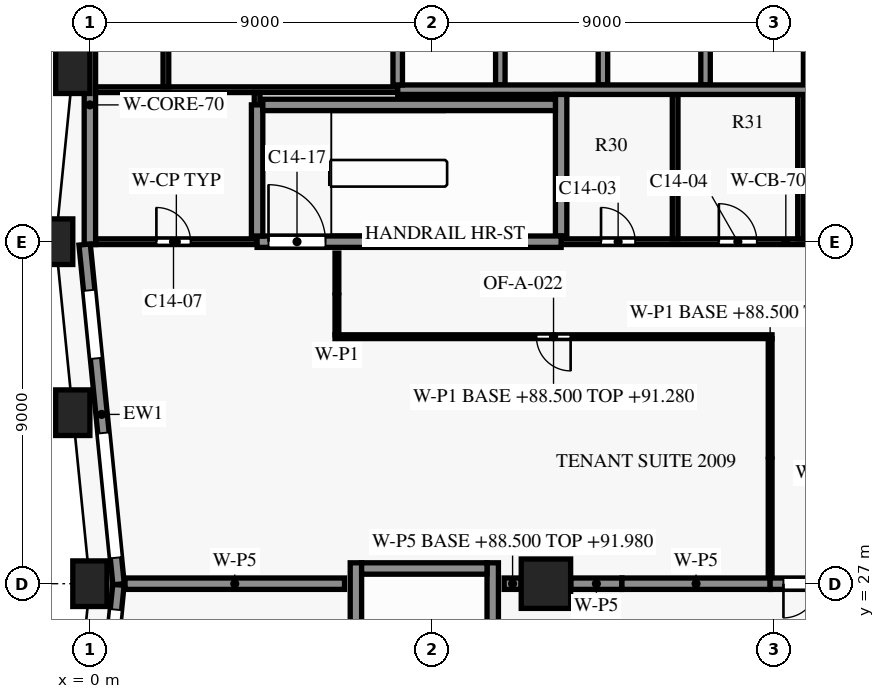
"""IFC4 building model, lengths in metres.
Left out: names, types, materials, properties, quantities, classifications, styles, units other than length and angle.
Written with IfcOpenShell. Run it as: python <this file> out.ifc"""

import sys

from ifc_helpers import new_model, si_unit, direction, frame, frame_2d, origin, origin_2d, place, context, subcontext, project, spatial, rectangle, extrude, element, fill, save


model = new_model("IFC4")
c1 = context("Model", 3, precision=1e-05, world=origin(), true_north=direction((0.0, 1.0)))
c2 = subcontext(c1, "Body", "Model", "MODEL_VIEW")
j1 = project(units=[si_unit("LENGTHUNIT", "METRE"), si_unit("PLANEANGLEUNIT", "RADIAN")], contexts=[c1])
p1 = place(None, origin())
s1 = spatial("IfcSite", under=j1, at=p1, CompositionType="ELEMENT")
p2 = place(p1, origin())
s2 = spatial("IfcBuilding", under=s1, at=p2, CompositionType="ELEMENT")
p3 = place(p2, frame((0.0, 0.0, 88.5)))
s3 = spatial("IfcBuildingStorey", under=s2, at=p3, CompositionType="ELEMENT", Elevation=88.5)
for number, where, z_axis, x_axis in (
    (1, (-0.45, 40.5, 0.0), (0.0, 0.0, 1.0), (-0.1, -0.995, 0.0)),
    (2, (-0.9, 36.0, 0.0), (0.0, 0.0, 1.0), (0.0, -1.0, 0.0)),
    (3, (-0.45, 31.5, 0.0), (0.0, 0.0, 1.0), (0.1, -0.995, 0.0)),
    (4, (0.0, 27.0, 0.0), (0.0, 0.0, 1.0), (0.0, -1.0, 0.0)),
):
    element("IfcColumn", number, at=place(p3, frame(where, z_axis=z_axis, x_axis=x_axis)), inside=s3, PredefinedType="COLUMN", context=c2, shape_type="SweptSolid", body=[
        extrude(rectangle(XDim=0.9, YDim=1.2, at=origin_2d()), origin(), (0.0, 0.0, 1.0), 3.8),
    ])
p4 = place(p3, frame((12.0, 27.0, 0.0), z_axis=(0.0, 0.0, 1.0), x_axis=(1.0, 0.0, 0.0)))
e5 = element("IfcColumn", 5, at=p4, inside=s3, PredefinedType="COLUMN", context=c2, shape_type="SweptSolid", body=[
    extrude(rectangle(XDim=1.3, YDim=1.3, at=origin_2d()), origin(), (0.0, 0.0, 1.0), 3.8),
])
p5 = place(p3, frame((0.755, 26.985, 0.0), z_axis=(0.0, 0.0, 1.0), x_axis=(-0.099479505633, 0.995039611251, 0.0)))
e6 = element("IfcWall", 6, at=p5, inside=s3, PredefinedType="SOLIDWALL", context=c2, shape_type="SweptSolid", body=[
    extrude(rectangle(XDim=8.985, YDim=0.3, at=frame_2d((4.492, 0.0))), origin(), (0.0, 0.0, 1.0), 3.15),
])
p6 = place(p5, frame((0.701, 0.0, 0.15)))
e7 = element("IfcOpeningElement", 7, at=p6, cuts=e6, PredefinedType="OPENING", context=c2, shape_type="SweptSolid", body=[
    extrude(rectangle(XDim=3.3, YDim=2.4, at=frame_2d((1.65, 1.2))), frame((0.0, 0.16, 0.0), z_axis=(0.0, -1.0, 0.0), x_axis=(1.0, 0.0, 0.0)), (0.0, 0.0, 1.0), 0.32),
])
p7 = place(p5, frame((5.974, 0.0, 0.75)))
e8 = element("IfcOpeningElement", 8, at=p7, cuts=e6, PredefinedType="OPENING", context=c2, shape_type="SweptSolid", body=[
    extrude(rectangle(XDim=1.8, YDim=1.8, at=frame_2d((0.9, 0.9))), frame((0.0, 0.16, 0.0), z_axis=(0.0, -1.0, 0.0), x_axis=(1.0, 0.0, 0.0)), (0.0, 0.0, 1.0), 0.32),
])
p8 = place(p3, frame((-0.148, 17.985, 0.0), z_axis=(0.0, 0.0, 1.0), x_axis=(0.099495688264, 0.995037993253, 0.0)))
e9 = element("IfcWall", 9, at=p8, inside=s3, PredefinedType="SOLIDWALL", context=c2, shape_type="SweptSolid", body=[
    extrude(rectangle(XDim=9.03, YDim=0.3, at=frame_2d((4.515, 0.0))), origin(), (0.0, 0.0, 1.0), 3.15),
])
p9 = place(p8, frame((1.301, 0.0, 0.75)))
e10 = element("IfcOpeningElement", 10, at=p9, cuts=e9, PredefinedType="OPENING", context=c2, shape_type="SweptSolid", body=[
    extrude(rectangle(XDim=1.8, YDim=1.8, at=frame_2d((0.9, 0.9))), frame((0.0, 0.16, 0.0), z_axis=(0.0, -1.0, 0.0), x_axis=(1.0, 0.0, 0.0)), (0.0, 0.0, 1.0), 0.32),
])
p10 = place(p8, frame((5.073, 0.0, 0.15)))
e11 = element("IfcOpeningElement", 11, at=p10, cuts=e9, PredefinedType="OPENING", context=c2, shape_type="SweptSolid", body=[
    extrude(rectangle(XDim=3.3, YDim=2.4, at=frame_2d((1.65, 1.2))), frame((0.0, 0.16, 0.0), z_axis=(0.0, -1.0, 0.0), x_axis=(1.0, 0.0, 0.0)), (0.0, 0.0, 1.0), 0.32),
])
p11 = place(p3, frame((7.15, 27.4, 0.0), z_axis=(0.0, 0.0, 1.0), x_axis=(1.0, 0.0, 0.0)))
e12 = element("IfcWall", 12, at=p11, inside=s3, PredefinedType="SHEAR", context=c2, shape_type="SweptSolid", body=[
    extrude(rectangle(XDim=3.3, YDim=0.3, at=frame_2d((1.65, 0.0))), origin(), (0.0, 0.0, 1.0), 3.5),
])
p12 = place(p3, frame((0.15, 36.0, 0.0), z_axis=(0.0, 0.0, 1.0), x_axis=(1.0, 0.0, 0.0)))
e13 = element("IfcWall", 13, at=p12, inside=s3, PredefinedType="PARTITIONING", context=c2, shape_type="SweptSolid", body=[
    extrude(rectangle(XDim=4.25, YDim=0.15, at=frame_2d((2.125, 0.0))), origin(), (0.0, 0.0, 1.0), 3.5),
])
p13 = place(p12, frame((1.6, 0.0, 0.0)))
e14 = element("IfcOpeningElement", 14, at=p13, cuts=e13, PredefinedType="OPENING", context=c2, shape_type="SweptSolid", body=[
    extrude(rectangle(XDim=0.9, YDim=2.1, at=frame_2d((0.45, 1.05))), frame((0.0, 0.085, 0.0), z_axis=(0.0, -1.0, 0.0), x_axis=(1.0, 0.0, 0.0)), (0.0, 0.0, 1.0), 0.17),
])
p14 = place(p3, frame((12.4, 36.0, 0.0), z_axis=(0.0, 0.0, 1.0), x_axis=(1.0, 0.0, 0.0)))
e15 = element("IfcWall", 15, at=p14, inside=s3, PredefinedType="SHEAR", context=c2, shape_type="SweptSolid", body=[
    extrude(rectangle(XDim=11.825, YDim=0.15, at=frame_2d((5.913, 0.0))), origin(), (0.0, 0.0, 1.0), 3.5),
])
p15 = place(p14, frame((1.05, 0.0, 0.0)))
e16 = element("IfcOpeningElement", 16, at=p15, cuts=e15, PredefinedType="OPENING", context=c2, shape_type="SweptSolid", body=[
    extrude(rectangle(XDim=0.9, YDim=2.1, at=frame_2d((0.45, 1.05))), frame((0.0, 0.085, 0.0), z_axis=(0.0, -1.0, 0.0), x_axis=(1.0, 0.0, 0.0)), (0.0, 0.0, 1.0), 0.17),
])
p16 = place(p14, frame((4.15, 0.0, 0.0)))
e17 = element("IfcOpeningElement", 17, at=p16, cuts=e15, PredefinedType="OPENING", context=c2, shape_type="SweptSolid", body=[
    extrude(rectangle(XDim=1.0, YDim=2.1, at=frame_2d((0.5, 1.05))), frame((0.0, 0.085, 0.0), z_axis=(0.0, -1.0, 0.0), x_axis=(1.0, 0.0, 0.0)), (0.0, 0.0, 1.0), 0.17),
])
p17 = place(p14, frame((7.35, 0.0, 0.0)))
e18 = element("IfcOpeningElement", 18, at=p17, cuts=e15, PredefinedType="OPENING", context=c2, shape_type="SweptSolid", body=[
    extrude(rectangle(XDim=0.9, YDim=2.1, at=frame_2d((0.45, 1.05))), frame((0.0, 0.085, 0.0), z_axis=(0.0, -1.0, 0.0), x_axis=(1.0, 0.0, 0.0)), (0.0, 0.0, 1.0), 0.17),
])
p18 = place(p14, frame((10.125, 0.0, 0.0)))
e19 = element("IfcOpeningElement", 19, at=p18, cuts=e15, PredefinedType="OPENING", context=c2, shape_type="SweptSolid", body=[
    extrude(rectangle(XDim=0.95, YDim=2.1, at=frame_2d((0.475, 1.05))), frame((0.0, 0.085, 0.0), z_axis=(0.0, -1.0, 0.0), x_axis=(1.0, 0.0, 0.0)), (0.0, 0.0, 1.0), 0.17),
])
p19 = place(p3, frame((4.4, 36.0, 0.0), z_axis=(0.0, 0.0, 1.0), x_axis=(1.0, 0.0, 0.0)))
e20 = element("IfcWall", 20, at=p19, inside=s3, PredefinedType="SHEAR", context=c2, shape_type="SweptSolid", body=[
    extrude(rectangle(XDim=8.0, YDim=0.3, at=frame_2d((4.0, 0.0))), origin(), (0.0, 0.0, 1.0), 3.5),
])
p20 = place(p19, frame((0.3, 0.0, 0.0)))
e21 = element("IfcOpeningElement", 21, at=p20, cuts=e20, PredefinedType="OPENING", context=c2, shape_type="SweptSolid", body=[
    extrude(rectangle(XDim=1.5, YDim=2.2, at=frame_2d((0.75, 1.1))), frame((0.0, 0.16, 0.0), z_axis=(0.0, -1.0, 0.0), x_axis=(1.0, 0.0, 0.0)), (0.0, 0.0, 1.0), 0.32),
])
p21 = place(p3, frame((4.55, 39.6, 0.0), z_axis=(0.0, 0.0, 1.0), x_axis=(1.0, 0.0, 0.0)))
e22 = element("IfcWall", 22, at=p21, inside=s3, PredefinedType="SHEAR", context=c2, shape_type="SweptSolid", body=[
    extrude(rectangle(XDim=7.7, YDim=0.3, at=frame_2d((3.85, 0.0))), origin(), (0.0, 0.0, 1.0), 3.5),
])
p22 = place(p3, frame((0.15, 40.0, 0.0), z_axis=(0.0, 0.0, 1.0), x_axis=(1.0, 0.0, 0.0)))
e23 = element("IfcWall", 23, at=p22, inside=s3, PredefinedType="PARTITIONING", context=c2, shape_type="SweptSolid", body=[
    extrude(rectangle(XDim=7.95, YDim=0.15, at=frame_2d((3.975, 0.0))), origin(), (0.0, 0.0, 1.0), 3.5),
])
p23 = place(p3, frame((8.1, 40.0, 0.0), z_axis=(0.0, 0.0, 1.0), x_axis=(1.0, 0.0, 0.0)))
e24 = element("IfcWall", 24, at=p23, inside=s3, PredefinedType="SHEAR", context=c2, shape_type="SweptSolid", body=[
    extrude(rectangle(XDim=13.5, YDim=0.25, at=frame_2d((6.75, 0.0))), origin(), (0.0, 0.0, 1.0), 3.5),
])
p24 = place(p3, frame((0.0, 35.925, 0.0), z_axis=(0.0, 0.0, 1.0), x_axis=(0.0, 1.0, 0.0)))
e25 = element("IfcWall", 25, at=p24, inside=s3, PredefinedType="SHEAR", context=c2, shape_type="SweptSolid", body=[
    extrude(rectangle(XDim=7.35, YDim=0.3, at=frame_2d((3.675, 0.0))), origin(), (0.0, 0.0, 1.0), 3.5),
])
p25 = place(p3, frame((2.0, 40.075, 0.0), z_axis=(0.0, 0.0, 1.0), x_axis=(0.0, 1.0, 0.0)))
e26 = element("IfcWall", 26, at=p25, inside=s3, PredefinedType="PARTITIONING", context=c2, shape_type="SweptSolid", body=[
    extrude(rectangle(XDim=3.05, YDim=0.15, at=frame_2d((1.525, 0.0))), origin(), (0.0, 0.0, 1.0), 3.5),
])
p26 = place(p3, frame((4.4, 39.6, 0.0), z_axis=(0.0, 0.0, 1.0), x_axis=(0.0, 1.0, 0.0)))
e27 = element("IfcWall", 27, at=p26, inside=s3, PredefinedType="PARTITIONING", context=c2, shape_type="SweptSolid", body=[
    extrude(rectangle(XDim=0.325, YDim=0.15, at=frame_2d((0.163, 0.0))), origin(), (0.0, 0.0, 1.0), 3.5),
])
p27 = place(p3, frame((4.4, 36.15, 0.0), z_axis=(0.0, 0.0, 1.0), x_axis=(0.0, 1.0, 0.0)))
e28 = element("IfcWall", 28, at=p27, inside=s3, PredefinedType="SHEAR", context=c2, shape_type="SweptSolid", body=[
    extrude(rectangle(XDim=3.45, YDim=0.3, at=frame_2d((1.725, 0.0))), origin(), (0.0, 0.0, 1.0), 3.5),
])
p28 = place(p3, frame((7.0, 19.25, 0.0), z_axis=(0.0, 0.0, 1.0), x_axis=(0.0, 1.0, 0.0)))
e29 = element("IfcWall", 29, at=p28, inside=s3, PredefinedType="SHEAR", context=c2, shape_type="SweptSolid", body=[
    extrude(rectangle(XDim=8.3, YDim=0.3, at=frame_2d((4.15, 0.0))), origin(), (0.0, 0.0, 1.0), 3.5),
])
p29 = place(p3, frame((8.1, 40.125, 0.0), z_axis=(0.0, 0.0, 1.0), x_axis=(0.0, 1.0, 0.0)))
e30 = element("IfcWall", 30, at=p29, inside=s3, PredefinedType="SHEAR", context=c2, shape_type="SweptSolid", body=[
    extrude(rectangle(XDim=2.95, YDim=0.25, at=frame_2d((1.475, 0.0))), origin(), (0.0, 0.0, 1.0), 3.5),
])
p30 = place(p3, frame((10.6, 19.25, 0.0), z_axis=(0.0, 0.0, 1.0), x_axis=(0.0, 1.0, 0.0)))
e31 = element("IfcWall", 31, at=p30, inside=s3, PredefinedType="SHEAR", context=c2, shape_type="SweptSolid", body=[
    extrude(rectangle(XDim=8.3, YDim=0.3, at=frame_2d((4.15, 0.0))), origin(), (0.0, 0.0, 1.0), 3.5),
])
p31 = place(p30, frame((0.55, 0.0, 0.0)))
e32 = element("IfcOpeningElement", 32, at=p31, cuts=e31, PredefinedType="OPENING", context=c2, shape_type="SweptSolid", body=[
    extrude(rectangle(XDim=1.2, YDim=2.2, at=frame_2d((0.6, 1.1))), frame((0.0, 0.16, 0.0), z_axis=(0.0, -1.0, 0.0), x_axis=(1.0, 0.0, 0.0)), (0.0, 0.0, 1.0), 0.32),
])
p32 = place(p3, frame((10.8, 40.125, 0.0), z_axis=(0.0, 0.0, 1.0), x_axis=(0.0, 1.0, 0.0)))
e33 = element("IfcWall", 33, at=p32, inside=s3, PredefinedType="SHEAR", context=c2, shape_type="SweptSolid", body=[
    extrude(rectangle(XDim=2.95, YDim=0.25, at=frame_2d((1.475, 0.0))), origin(), (0.0, 0.0, 1.0), 3.5),
])
p33 = place(p3, frame((12.4, 36.15, 0.0), z_axis=(0.0, 0.0, 1.0), x_axis=(0.0, 1.0, 0.0)))
e34 = element("IfcWall", 34, at=p33, inside=s3, PredefinedType="SHEAR", context=c2, shape_type="SweptSolid", body=[
    extrude(rectangle(XDim=3.725, YDim=0.3, at=frame_2d((1.863, 0.0))), origin(), (0.0, 0.0, 1.0), 3.5),
])
p34 = place(p3, frame((13.5, 40.125, 0.0), z_axis=(0.0, 0.0, 1.0), x_axis=(0.0, 1.0, 0.0)))
e35 = element("IfcWall", 35, at=p34, inside=s3, PredefinedType="SHEAR", context=c2, shape_type="SweptSolid", body=[
    extrude(rectangle(XDim=2.95, YDim=0.25, at=frame_2d((1.475, 0.0))), origin(), (0.0, 0.0, 1.0), 3.5),
])
p35 = place(p3, frame((15.4, 36.075, 0.0), z_axis=(0.0, 0.0, 1.0), x_axis=(0.0, 1.0, 0.0)))
e36 = element("IfcWall", 36, at=p35, inside=s3, PredefinedType="PARTITIONING", context=c2, shape_type="SweptSolid", body=[
    extrude(rectangle(XDim=3.8, YDim=0.15, at=frame_2d((1.9, 0.0))), origin(), (0.0, 0.0, 1.0), 3.5),
])
p36 = place(p3, frame((16.2, 40.125, 0.0), z_axis=(0.0, 0.0, 1.0), x_axis=(0.0, 1.0, 0.0)))
e37 = element("IfcWall", 37, at=p36, inside=s3, PredefinedType="SHEAR", context=c2, shape_type="SweptSolid", body=[
    extrude(rectangle(XDim=2.95, YDim=0.25, at=frame_2d((1.475, 0.0))), origin(), (0.0, 0.0, 1.0), 3.5),
])
p37 = place(p3, frame((18.7, 36.075, 0.0), z_axis=(0.0, 0.0, 1.0), x_axis=(0.0, 1.0, 0.0)))
e38 = element("IfcWall", 38, at=p37, inside=s3, PredefinedType="PARTITIONING", context=c2, shape_type="SweptSolid", body=[
    extrude(rectangle(XDim=3.8, YDim=0.15, at=frame_2d((1.9, 0.0))), origin(), (0.0, 0.0, 1.0), 3.5),
])
p38 = place(p3, frame((18.9, 40.125, 0.0), z_axis=(0.0, 0.0, 1.0), x_axis=(0.0, 1.0, 0.0)))
e39 = element("IfcWall", 39, at=p38, inside=s3, PredefinedType="SHEAR", context=c2, shape_type="SweptSolid", body=[
    extrude(rectangle(XDim=2.95, YDim=0.25, at=frame_2d((1.475, 0.0))), origin(), (0.0, 0.0, 1.0), 3.5),
])
p39 = place(p3, frame((0.925, 27.0, 0.0), z_axis=(0.0, 0.0, 1.0), x_axis=(1.0, 0.0, 0.0)))
e40 = element("IfcWall", 40, at=p39, inside=s3, PredefinedType="PARTITIONING", context=c2, shape_type="SweptSolid", body=[
    extrude(rectangle(XDim=5.775, YDim=0.3, at=frame_2d((2.888, 0.0))), origin(), (0.0, 0.0, 1.0), 2.78),
])
p40 = place(p3, frame((10.9, 27.0, 0.0), z_axis=(0.0, 0.0, 1.0), x_axis=(1.0, 0.0, 0.0)))
e41 = element("IfcWall", 41, at=p40, inside=s3, PredefinedType="PARTITIONING", context=c2, shape_type="SweptSolid", body=[
    extrude(rectangle(XDim=0.445, YDim=0.3, at=frame_2d((0.223, 0.0))), origin(), (0.0, 0.0, 1.0), 3.48),
])
p41 = place(p3, frame((12.655, 27.0, 0.0), z_axis=(0.0, 0.0, 1.0), x_axis=(1.0, 0.0, 0.0)))
e42 = element("IfcWall", 42, at=p41, inside=s3, PredefinedType="PARTITIONING", context=c2, shape_type="SweptSolid", body=[
    extrude(rectangle(XDim=1.345, YDim=0.3, at=frame_2d((0.672, 0.0))), origin(), (0.0, 0.0, 1.0), 2.78),
])
p42 = place(p3, frame((14.0, 27.0, 0.0), z_axis=(0.0, 0.0, 1.0), x_axis=(1.0, 0.0, 0.0)))
e43 = element("IfcWall", 43, at=p42, inside=s3, PredefinedType="PARTITIONING", context=c2, shape_type="SweptSolid", body=[
    extrude(rectangle(XDim=3.9, YDim=0.3, at=frame_2d((1.95, 0.0))), origin(), (0.0, 0.0, 1.0), 2.78),
])
p43 = place(p3, frame((20.4, 27.0, 0.0), z_axis=(0.0, 0.0, 1.0), x_axis=(-1.0, 0.0, 0.0)))
e44 = element("IfcWall", 44, at=p43, inside=s3, PredefinedType="PARTITIONING", context=c2, shape_type="SweptSolid", body=[
    extrude(rectangle(XDim=2.5, YDim=0.3, at=frame_2d((1.25, 0.0))), origin(), (0.0, 0.0, 1.0), 2.78),
])
p44 = place(p43, frame((0.35, 0.0, 0.0)))
e45 = element("IfcOpeningElement", 45, at=p44, cuts=e44, PredefinedType="OPENING", context=c2, shape_type="SweptSolid", body=[
    extrude(rectangle(XDim=1.8, YDim=2.1, at=frame_2d((0.9, 1.05))), frame((0.0, 0.16, 0.0), z_axis=(0.0, -1.0, 0.0), x_axis=(1.0, 0.0, 0.0)), (0.0, 0.0, 1.0), 0.32),
])
p45 = place(p3, frame((17.9, 27.17, 0.0), z_axis=(0.0, 0.0, 1.0), x_axis=(0.0, 1.0, 0.0)))
e46 = element("IfcWall", 46, at=p45, inside=s3, PredefinedType="PARTITIONING", context=c2, shape_type="SweptSolid", body=[
    extrude(rectangle(XDim=6.28, YDim=0.1, at=frame_2d((3.14, 0.0))), origin(), (0.0, 0.0, 1.0), 2.78),
])
p46 = place(p3, frame((17.95, 33.5, 0.0), z_axis=(0.0, 0.0, 1.0), x_axis=(-1.0, 0.0, 0.0)))
e47 = element("IfcWall", 47, at=p46, inside=s3, PredefinedType="PARTITIONING", context=c2, shape_type="SweptSolid", body=[
    extrude(rectangle(XDim=11.5, YDim=0.1, at=frame_2d((5.75, 0.0))), origin(), (0.0, 0.0, 1.0), 2.78),
])
p47 = place(p46, frame((5.3, 0.0, 0.0)))
e48 = element("IfcOpeningElement", 48, at=p47, cuts=e47, PredefinedType="OPENING", context=c2, shape_type="SweptSolid", body=[
    extrude(rectangle(XDim=0.9, YDim=2.1, at=frame_2d((0.45, 1.05))), frame((0.0, 0.06, 0.0), z_axis=(0.0, -1.0, 0.0), x_axis=(1.0, 0.0, 0.0)), (0.0, 0.0, 1.0), 0.12),
])
p48 = place(p3, frame((6.5, 33.55, 0.0), z_axis=(0.0, 0.0, 1.0), x_axis=(0.0, 1.0, 0.0)))
e49 = element("IfcWall", 49, at=p48, inside=s3, PredefinedType="PARTITIONING", context=c2, shape_type="SweptSolid", body=[
    extrude(rectangle(XDim=2.15, YDim=0.1, at=frame_2d((1.075, 0.0))), origin(), (0.0, 0.0, 1.0), 3.48),
])
p49 = place(p6, origin())
e50 = element("IfcWindow", 50, at=p49, inside=s3, PartitioningType="SINGLE_PANEL", PredefinedType="WINDOW", context=c2, shape_type="SweptSolid", body=[
    extrude(rectangle(XDim=3.3, YDim=2.4, at=frame_2d((1.65, 1.2))), frame((0.0, 0.03, 0.0), z_axis=(0.0, -1.0, 0.0), x_axis=(1.0, 0.0, 0.0)), (0.0, 0.0, 1.0), 0.06),
])
fill(e7, e50)
p50 = place(p7, origin())
e51 = element("IfcWindow", 51, at=p50, inside=s3, PartitioningType="SINGLE_PANEL", PredefinedType="WINDOW", context=c2, shape_type="SweptSolid", body=[
    extrude(rectangle(XDim=1.8, YDim=1.8, at=frame_2d((0.9, 0.9))), frame((0.0, 0.03, 0.0), z_axis=(0.0, -1.0, 0.0), x_axis=(1.0, 0.0, 0.0)), (0.0, 0.0, 1.0), 0.06),
])
fill(e8, e51)
p51 = place(p10, origin())
e52 = element("IfcWindow", 52, at=p51, inside=s3, PartitioningType="SINGLE_PANEL", PredefinedType="WINDOW", context=c2, shape_type="SweptSolid", body=[
    extrude(rectangle(XDim=3.3, YDim=2.4, at=frame_2d((1.65, 1.2))), frame((0.0, 0.03, 0.0), z_axis=(0.0, -1.0, 0.0), x_axis=(1.0, 0.0, 0.0)), (0.0, 0.0, 1.0), 0.06),
])
fill(e11, e52)
p52 = place(p15, origin())
e53 = element("IfcDoor", 53, at=p52, inside=s3, OperationType="SINGLE_SWING_RIGHT", PredefinedType="DOOR", context=c2, shape_type="SweptSolid", body=[
    extrude(rectangle(XDim=0.9, YDim=2.1, at=frame_2d((0.45, 1.05))), frame((0.0, 0.025, 0.0), z_axis=(0.0, -1.0, 0.0), x_axis=(1.0, 0.0, 0.0)), (0.0, 0.0, 1.0), 0.05),
])
fill(e16, e53)
p53 = place(p16, origin())
e54 = element("IfcDoor", 54, at=p53, inside=s3, OperationType="SINGLE_SWING_LEFT", PredefinedType="DOOR", context=c2, shape_type="SweptSolid", body=[
    extrude(rectangle(XDim=1.0, YDim=2.1, at=frame_2d((0.5, 1.05))), frame((0.0, 0.025, 0.0), z_axis=(0.0, -1.0, 0.0), x_axis=(1.0, 0.0, 0.0)), (0.0, 0.0, 1.0), 0.05),
])
fill(e17, e54)
p54 = place(p13, origin())
e55 = element("IfcDoor", 55, at=p54, inside=s3, OperationType="SINGLE_SWING_LEFT", PredefinedType="DOOR", context=c2, shape_type="SweptSolid", body=[
    extrude(rectangle(XDim=0.9, YDim=2.1, at=frame_2d((0.45, 1.05))), frame((0.0, 0.025, 0.0), z_axis=(0.0, -1.0, 0.0), x_axis=(1.0, 0.0, 0.0)), (0.0, 0.0, 1.0), 0.05),
])
fill(e14, e55)
p55 = place(p20, origin())
e56 = element("IfcDoor", 56, at=p55, inside=s3, OperationType="SINGLE_SWING_RIGHT", PredefinedType="DOOR", context=c2, shape_type="SweptSolid", body=[
    extrude(rectangle(XDim=1.5, YDim=2.2, at=frame_2d((0.75, 1.1))), frame((0.0, 0.025, 0.0), z_axis=(0.0, -1.0, 0.0), x_axis=(1.0, 0.0, 0.0)), (0.0, 0.0, 1.0), 0.05),
])
fill(e21, e56)
p56 = place(p47, origin())
e57 = element("IfcDoor", 57, at=p56, inside=s3, OperationType="SINGLE_SWING_LEFT", PredefinedType="DOOR", context=c2, shape_type="SweptSolid", body=[
    extrude(rectangle(XDim=0.9, YDim=2.1, at=frame_2d((0.45, 1.05))), frame((0.0, 0.025, 0.0), z_axis=(0.0, -1.0, 0.0), x_axis=(1.0, 0.0, 0.0)), (0.0, 0.0, 1.0), 0.05),
])
fill(e48, e57)
p57 = place(p44, origin())
e58 = element("IfcDoor", 58, at=p57, inside=s3, OperationType="DOUBLE_DOOR_SINGLE_SWING", PredefinedType="DOOR", context=c2, shape_type="SweptSolid", body=[
    extrude(rectangle(XDim=1.8, YDim=2.1, at=frame_2d((0.9, 1.05))), frame((0.0, 0.025, 0.0), z_axis=(0.0, -1.0, 0.0), x_axis=(1.0, 0.0, 0.0)), (0.0, 0.0, 1.0), 0.05),
])
fill(e45, e58)
save(model, sys.argv[1])
